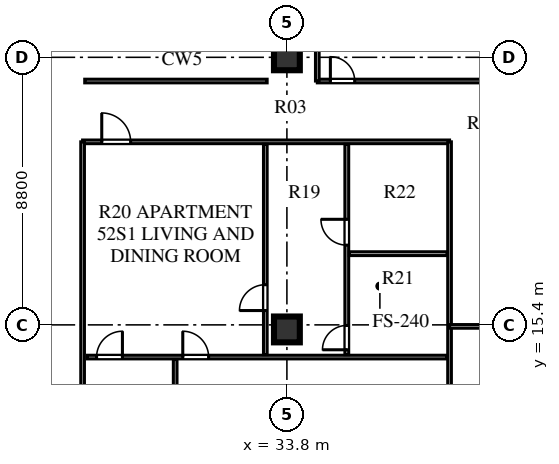
"""IFC4 building model, lengths in metres.
Left out: names, types, materials, properties, quantities, classifications, styles, units other than length and angle.
Written with IfcOpenShell. Run it as: python <this file> out.ifc"""

import sys

from ifc_helpers import new_model, si_unit, direction, frame, frame_2d, origin, origin_2d, place, context, subcontext, project, spatial, rectangle, extrude, element, fill, save


model = new_model("IFC4")
c1 = context("Model", 3, precision=1e-05, world=origin(), true_north=direction((0.0, 1.0)))
c2 = subcontext(c1, "Body", "Model", "MODEL_VIEW")
j1 = project(units=[si_unit("LENGTHUNIT", "METRE"), si_unit("PLANEANGLEUNIT", "RADIAN")], contexts=[c1])
p1 = place(None, origin())
s1 = spatial("IfcSite", under=j1, at=p1, CompositionType="ELEMENT")
p2 = place(p1, origin())
s2 = spatial("IfcBuilding", under=s1, at=p2, CompositionType="ELEMENT")
p3 = place(p2, frame((0.0, 0.0, 214.1)))
s3 = spatial("IfcBuildingStorey", under=s2, at=p3, CompositionType="ELEMENT", Elevation=214.1)
for number, where, z_axis, x_axis in (
    (1, (33.8, 15.25, 0.0), (0.0, 0.0, 1.0), (1.0, 0.0, 0.0)),
    (2, (33.8, 24.2, 0.0), (0.0, 0.0, 1.0), (1.0, 0.0, 0.0)),
):
    element("IfcColumn", number, at=place(p3, frame(where, z_axis=z_axis, x_axis=x_axis)), inside=s3, PredefinedType="COLUMN", context=c2, shape_type="SweptSolid", body=[
        extrude(rectangle(XDim=0.85, YDim=0.85, at=origin_2d()), origin(), (0.0, 0.0, 1.0), 3.66),
    ])
p4 = place(p3, frame((27.08, 21.42, 0.0), z_axis=(0.0, 0.0, 1.0), x_axis=(1.0, 0.0, 0.0)))
e3 = element("IfcWall", 3, at=p4, inside=s3, PredefinedType="PARTITIONING", context=c2, shape_type="SweptSolid", body=[
    extrude(rectangle(XDim=12.07, YDim=0.12, at=frame_2d((6.035, 0.0))), origin(), (0.0, 0.0, 1.0), 3.31),
])
p5 = place(p4, frame((0.63, 0.0, 0.0)))
e4 = element("IfcOpeningElement", 4, at=p5, cuts=e3, PredefinedType="OPENING", context=c2, shape_type="SweptSolid", body=[
    extrude(rectangle(XDim=0.95, YDim=2.1, at=frame_2d((0.475, 1.05))), frame((0.0, 0.07, 0.0), z_axis=(0.0, -1.0, 0.0), x_axis=(1.0, 0.0, 0.0)), (0.0, 0.0, 1.0), 0.14),
])
p6 = place(p3, frame((27.08, 7.88, 0.0), z_axis=(0.0, 0.0, 1.0), x_axis=(0.0, 1.0, 0.0)))
e5 = element("IfcWall", 5, at=p6, inside=s3, PredefinedType="PARTITIONING", context=c2, shape_type="SweptSolid", body=[
    extrude(rectangle(XDim=13.54, YDim=0.12, at=frame_2d((6.77, 0.0))), origin(), (0.0, 0.0, 1.0), 3.66),
])
p7 = place(p3, frame((27.15, 23.42, 0.0), z_axis=(0.0, 0.0, 1.0), x_axis=(1.0, 0.0, 0.0)))
e6 = element("IfcWall", 6, at=p7, inside=s3, PredefinedType="PARTITIONING", context=c2, shape_type="SweptSolid", body=[
    extrude(rectangle(XDim=6.0, YDim=0.12, at=frame_2d((3.0, 0.0))), origin(), (0.0, 0.0, 1.0), 3.66),
])
p8 = place(p3, frame((39.15, 7.88, 0.0), z_axis=(0.0, 0.0, 1.0), x_axis=(0.0, 1.0, 0.0)))
e7 = element("IfcWall", 7, at=p8, inside=s3, PredefinedType="PARTITIONING", context=c2, shape_type="SweptSolid", body=[
    extrude(rectangle(XDim=13.54, YDim=0.12, at=frame_2d((6.77, 0.0))), origin(), (0.0, 0.0, 1.0), 3.66),
])
p9 = place(p3, frame((27.24, 14.341, 0.0), z_axis=(0.0, 0.0, 1.0), x_axis=(1.0, 0.0, 0.0)))
e8 = element("IfcWall", 8, at=p9, inside=s3, PredefinedType="PARTITIONING", context=c2, shape_type="SweptSolid", body=[
    extrude(rectangle(XDim=11.83, YDim=0.12, at=frame_2d((5.915, 0.0))), origin(), (0.0, 0.0, 1.0), 3.66),
])
p10 = place(p9, frame((0.3, 0.0, 0.0)))
e9 = element("IfcOpeningElement", 9, at=p10, cuts=e8, PredefinedType="OPENING", context=c2, shape_type="SweptSolid", body=[
    extrude(rectangle(XDim=0.85, YDim=2.08, at=frame_2d((0.425, 1.04))), frame((0.0, 0.07, 0.0), z_axis=(0.0, -1.0, 0.0), x_axis=(1.0, 0.0, 0.0)), (0.0, 0.0, 1.0), 0.14),
])
p11 = place(p9, frame((3.135, 0.0, 0.0)))
e10 = element("IfcOpeningElement", 10, at=p11, cuts=e8, PredefinedType="OPENING", context=c2, shape_type="SweptSolid", body=[
    extrude(rectangle(XDim=0.85, YDim=2.08, at=frame_2d((0.425, 1.04))), frame((0.0, 0.07, 0.0), z_axis=(0.0, -1.0, 0.0), x_axis=(1.0, 0.0, 0.0)), (0.0, 0.0, 1.0), 0.14),
])
p12 = place(p3, frame((35.77, 14.421, 0.0), z_axis=(0.0, 0.0, 1.0), x_axis=(0.0, 1.0, 0.0)))
e11 = element("IfcWall", 11, at=p12, inside=s3, PredefinedType="PLUMBINGWALL", context=c2, shape_type="SweptSolid", body=[
    extrude(rectangle(XDim=6.919, YDim=0.125, at=frame_2d((3.459, 0.0))), origin(), (0.0, 0.0, 1.0), 3.66),
])
p13 = place(p12, frame((0.16, 0.0, 0.0)))
e12 = element("IfcOpeningElement", 12, at=p13, cuts=e11, PredefinedType="OPENING", context=c2, shape_type="SweptSolid", body=[
    extrude(rectangle(XDim=0.8, YDim=2.05, at=frame_2d((0.4, 1.025))), frame((0.0, 0.073, 0.0), z_axis=(0.0, -1.0, 0.0), x_axis=(1.0, 0.0, 0.0)), (0.0, 0.0, 1.0), 0.145),
])
p14 = place(p12, frame((3.601, 0.0, 0.0)))
e13 = element("IfcOpeningElement", 13, at=p14, cuts=e11, PredefinedType="OPENING", context=c2, shape_type="SweptSolid", body=[
    extrude(rectangle(XDim=0.85, YDim=2.08, at=frame_2d((0.425, 1.04))), frame((0.0, 0.073, 0.0), z_axis=(0.0, -1.0, 0.0), x_axis=(1.0, 0.0, 0.0)), (0.0, 0.0, 1.0), 0.145),
])
p15 = place(p3, frame((35.85, 17.742, 0.0), z_axis=(0.0, 0.0, 1.0), x_axis=(1.0, 0.0, 0.0)))
e14 = element("IfcWall", 14, at=p15, inside=s3, PredefinedType="PLUMBINGWALL", context=c2, shape_type="SweptSolid", body=[
    extrude(rectangle(XDim=3.22, YDim=0.125, at=frame_2d((1.61, 0.0))), origin(), (0.0, 0.0, 1.0), 3.66),
])
p16 = place(p3, frame((33.09, 14.421, 0.0), z_axis=(0.0, 0.0, 1.0), x_axis=(0.0, 1.0, 0.0)))
e15 = element("IfcWall", 15, at=p16, inside=s3, PredefinedType="PARTITIONING", context=c2, shape_type="SweptSolid", body=[
    extrude(rectangle(XDim=6.919, YDim=0.12, at=frame_2d((3.459, 0.0))), origin(), (0.0, 0.0, 1.0), 3.66),
])
p17 = place(p16, frame((1.45, 0.0, 0.0)))
e16 = element("IfcOpeningElement", 16, at=p17, cuts=e15, PredefinedType="OPENING", context=c2, shape_type="SweptSolid", body=[
    extrude(rectangle(XDim=0.85, YDim=2.08, at=frame_2d((0.425, 1.04))), frame((0.0, 0.07, 0.0), z_axis=(0.0, -1.0, 0.0), x_axis=(1.0, 0.0, 0.0)), (0.0, 0.0, 1.0), 0.14),
])
p18 = place(p3, frame((30.125, 7.88, 0.0), z_axis=(0.0, 0.0, 1.0), x_axis=(0.0, 1.0, 0.0)))
e17 = element("IfcWall", 17, at=p18, inside=s3, PredefinedType="PARTITIONING", context=c2, shape_type="SweptSolid", body=[
    extrude(rectangle(XDim=6.381, YDim=0.12, at=frame_2d((3.19, 0.0))), origin(), (0.0, 0.0, 1.0), 3.66),
])
p19 = place(p3, frame((39.15, 15.35, 0.0), z_axis=(0.0, 0.0, 1.0), x_axis=(1.0, 0.0, 0.0)))
e18 = element("IfcWall", 18, at=p19, inside=s3, PredefinedType="PARTITIONING", context=c2, shape_type="SweptSolid", body=[
    extrude(rectangle(XDim=11.37, YDim=0.12, at=frame_2d((5.685, 0.0))), origin(), (0.0, 0.0, 1.0), 3.06),
])
p20 = place(p3, frame((34.8, 23.42, 0.0), z_axis=(0.0, 0.0, 1.0), x_axis=(1.0, 0.0, 0.0)))
e19 = element("IfcWall", 19, at=p20, inside=s3, PredefinedType="PARTITIONING", context=c2, shape_type="SweptSolid", body=[
    extrude(rectangle(XDim=5.9, YDim=0.12, at=frame_2d((2.95, 0.0))), origin(), (0.0, 0.0, 1.0), 3.66),
])
p21 = place(p20, frame((0.43, 0.0, 0.0)))
e20 = element("IfcOpeningElement", 20, at=p21, cuts=e19, PredefinedType="OPENING", context=c2, shape_type="SweptSolid", body=[
    extrude(rectangle(XDim=0.8, YDim=2.05, at=frame_2d((0.4, 1.025))), frame((0.0, 0.07, 0.0), z_axis=(0.0, -1.0, 0.0), x_axis=(1.0, 0.0, 0.0)), (0.0, 0.0, 1.0), 0.14),
])
p22 = place(p3, frame((34.8, 23.42, 0.0), z_axis=(0.0, 0.0, 1.0), x_axis=(0.0, 1.0, 0.0)))
e21 = element("IfcWall", 21, at=p22, inside=s3, PredefinedType="PARTITIONING", context=c2, shape_type="SweptSolid", body=[
    extrude(rectangle(XDim=3.78, YDim=0.12, at=frame_2d((1.89, 0.0))), origin(), (0.0, 0.0, 1.0), 3.66),
])
p23 = place(p17, origin())
e22 = element("IfcDoor", 22, at=p23, inside=s3, OperationType="SINGLE_SWING_LEFT", PredefinedType="DOOR", context=c2, shape_type="SweptSolid", body=[
    extrude(rectangle(XDim=0.85, YDim=2.08, at=frame_2d((0.425, 1.04))), frame((0.0, 0.025, 0.0), z_axis=(0.0, -1.0, 0.0), x_axis=(1.0, 0.0, 0.0)), (0.0, 0.0, 1.0), 0.05),
])
fill(e16, e22)
p24 = place(p13, origin())
e23 = element("IfcDoor", 23, at=p24, inside=s3, OperationType="SINGLE_SWING_LEFT", PredefinedType="DOOR", context=c2, shape_type="SweptSolid", body=[
    extrude(rectangle(XDim=0.8, YDim=2.05, at=frame_2d((0.4, 1.025))), frame((0.0, 0.025, 0.0), z_axis=(0.0, -1.0, 0.0), x_axis=(1.0, 0.0, 0.0)), (0.0, 0.0, 1.0), 0.05),
])
fill(e12, e23)
p25 = place(p14, origin())
e24 = element("IfcDoor", 24, at=p25, inside=s3, OperationType="SINGLE_SWING_RIGHT", PredefinedType="DOOR", context=c2, shape_type="SweptSolid", body=[
    extrude(rectangle(XDim=0.85, YDim=2.08, at=frame_2d((0.425, 1.04))), frame((0.0, 0.025, 0.0), z_axis=(0.0, -1.0, 0.0), x_axis=(1.0, 0.0, 0.0)), (0.0, 0.0, 1.0), 0.05),
])
fill(e13, e24)
p26 = place(p10, frame((0.85, 0.0, 0.0), z_axis=(0.0, 0.0, 1.0), x_axis=(-1.0, 0.0, 0.0)))
e25 = element("IfcDoor", 25, at=p26, inside=s3, OperationType="SINGLE_SWING_LEFT", PredefinedType="DOOR", context=c2, shape_type="SweptSolid", body=[
    extrude(rectangle(XDim=0.85, YDim=2.08, at=frame_2d((0.425, 1.04))), frame((0.0, 0.025, 0.0), z_axis=(0.0, -1.0, 0.0), x_axis=(1.0, 0.0, 0.0)), (0.0, 0.0, 1.0), 0.05),
])
fill(e9, e25)
p27 = place(p11, frame((0.85, 0.0, 0.0), z_axis=(0.0, 0.0, 1.0), x_axis=(-1.0, 0.0, 0.0)))
e26 = element("IfcDoor", 26, at=p27, inside=s3, OperationType="SINGLE_SWING_RIGHT", PredefinedType="DOOR", context=c2, shape_type="SweptSolid", body=[
    extrude(rectangle(XDim=0.85, YDim=2.08, at=frame_2d((0.425, 1.04))), frame((0.0, 0.025, 0.0), z_axis=(0.0, -1.0, 0.0), x_axis=(1.0, 0.0, 0.0)), (0.0, 0.0, 1.0), 0.05),
])
fill(e10, e26)
p28 = place(p5, frame((0.95, 0.0, 0.0), z_axis=(0.0, 0.0, 1.0), x_axis=(-1.0, 0.0, 0.0)))
e27 = element("IfcDoor", 27, at=p28, inside=s3, OperationType="SINGLE_SWING_RIGHT", PredefinedType="DOOR", context=c2, shape_type="SweptSolid", body=[
    extrude(rectangle(XDim=0.95, YDim=2.1, at=frame_2d((0.475, 1.05))), frame((0.0, 0.025, 0.0), z_axis=(0.0, -1.0, 0.0), x_axis=(1.0, 0.0, 0.0)), (0.0, 0.0, 1.0), 0.05),
])
fill(e4, e27)
p29 = place(p21, origin())
e28 = element("IfcDoor", 28, at=p29, inside=s3, OperationType="SINGLE_SWING_LEFT", PredefinedType="DOOR", context=c2, shape_type="SweptSolid", body=[
    extrude(rectangle(XDim=0.8, YDim=2.05, at=frame_2d((0.4, 1.025))), frame((0.0, 0.025, 0.0), z_axis=(0.0, -1.0, 0.0), x_axis=(1.0, 0.0, 0.0)), (0.0, 0.0, 1.0), 0.05),
])
fill(e20, e28)
save(model, sys.argv[1])
